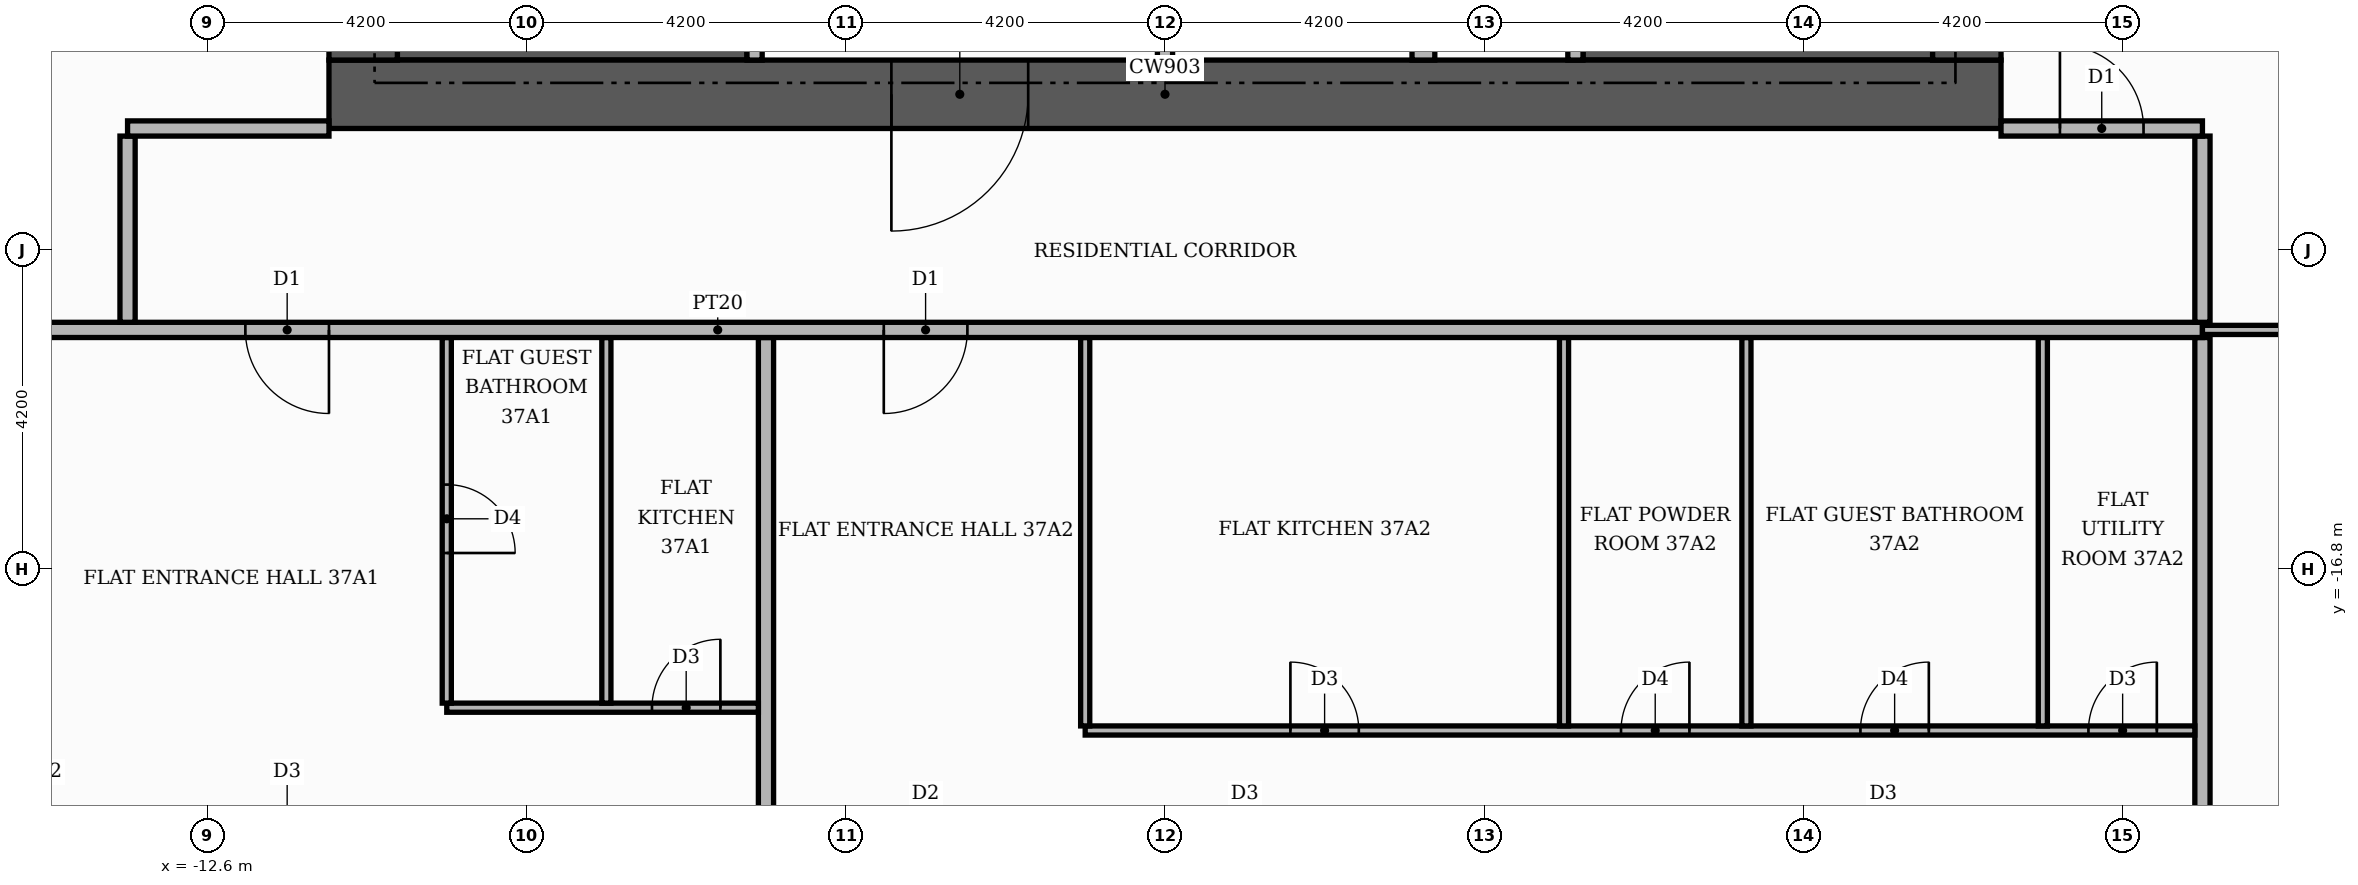
"""IFC4 building model, lengths in metres.
Left out: names, types, materials, properties, quantities, classifications, styles, units other than length and angle.
Written with IfcOpenShell. Run it as: python <this file> out.ifc"""

import sys

from ifc_helpers import new_model, si_unit, direction, frame, frame_2d, origin, place, context, subcontext, project, spatial, rectangle, extrude, element, fill, save


model = new_model("IFC4")
c1 = context("Model", 3, precision=1e-05, world=origin(), true_north=direction((0.0, 1.0)))
c2 = subcontext(c1, "Body", "Model", "MODEL_VIEW")
j1 = project(units=[si_unit("LENGTHUNIT", "METRE"), si_unit("PLANEANGLEUNIT", "RADIAN")], contexts=[c1])
p1 = place(None, origin())
s1 = spatial("IfcSite", under=j1, at=p1, CompositionType="ELEMENT")
p2 = place(p1, origin())
s2 = spatial("IfcBuilding", under=s1, at=p2, CompositionType="ELEMENT")
p3 = place(p2, frame((0.0, 0.0, 157.2)))
s3 = spatial("IfcBuildingStorey", under=s2, at=p3, CompositionType="ELEMENT", Elevation=157.2)
for number, where, z_axis, x_axis in (
    (1, (-10.1, -9.15, 0.0), (0.0, 0.0, 1.0), (1.0, 0.0, 0.0)),
    (2, (5.5, -9.15, 0.0), (0.0, 0.0, 1.0), (1.0, 0.0, 0.0)),
):
    element("IfcWall", number, at=place(p3, frame(where, z_axis=z_axis, x_axis=x_axis)), inside=s3, PredefinedType="SHEAR", context=c2, shape_type="SweptSolid", body=[
        extrude(rectangle(XDim=4.6, YDim=1.9, at=frame_2d((2.3, 0.0))), origin(), (0.0, 0.0, 1.0), 3.48),
    ])
p4 = place(p3, frame((-11.0, -10.55, 0.0), z_axis=(0.0, 0.0, 1.0), x_axis=(1.0, 0.0, 0.0)))
e3 = element("IfcWall", 3, at=p4, inside=s3, PredefinedType="SHEAR", context=c2, shape_type="SweptSolid", body=[
    extrude(rectangle(XDim=22.0, YDim=0.9, at=frame_2d((11.0, 0.0))), origin(), (0.0, 0.0, 1.0), 3.48),
])
p5 = place(p4, frame((7.4, 0.0, 0.0)))
e4 = element("IfcOpeningElement", 4, at=p5, cuts=e3, PredefinedType="OPENING", context=c2, shape_type="SweptSolid", body=[
    extrude(rectangle(XDim=1.8, YDim=2.2, at=frame_2d((0.9, 1.1))), frame((0.0, 0.46, 0.0), z_axis=(0.0, -1.0, 0.0), x_axis=(1.0, 0.0, 0.0)), (0.0, 0.0, 1.0), 0.92),
])
for number, where, z_axis, x_axis in (
    (5, (-10.55, -10.1, 0.0), (0.0, 0.0, 1.0), (0.0, 1.0, 0.0)),
    (6, (10.55, -10.1, 0.0), (0.0, 0.0, 1.0), (0.0, 1.0, 0.0)),
):
    element("IfcWall", number, at=place(p3, frame(where, z_axis=z_axis, x_axis=x_axis)), inside=s3, PredefinedType="SHEAR", context=c2, shape_type="SweptSolid", body=[
        extrude(rectangle(XDim=20.2, YDim=0.9, at=frame_2d((10.1, 0.0))), origin(), (0.0, 0.0, 1.0), 3.48),
    ])
p6 = place(p3, frame((-5.4, -10.1, 0.0), z_axis=(0.0, 0.0, 1.0), x_axis=(0.0, 1.0, 0.0)))
e7 = element("IfcWall", 7, at=p6, inside=s3, PredefinedType="PARTITIONING", context=c2, shape_type="SweptSolid", body=[
    extrude(rectangle(XDim=4.6, YDim=0.2, at=frame_2d((2.3, 0.0))), origin(), (0.0, 0.0, 1.0), 3.48),
])
p7 = place(p6, frame((2.9, 0.0, 0.0)))
e8 = element("IfcOpeningElement", 8, at=p7, cuts=e7, PredefinedType="OPENING", context=c2, shape_type="SweptSolid", body=[
    extrude(rectangle(XDim=1.0, YDim=2.1, at=frame_2d((0.5, 1.05))), frame((0.0, 0.11, 0.0), z_axis=(0.0, -1.0, 0.0), x_axis=(1.0, 0.0, 0.0)), (0.0, 0.0, 1.0), 0.22),
])
p8 = place(p3, frame((0.0, -10.1, 0.0), z_axis=(0.0, 0.0, 1.0), x_axis=(0.0, 1.0, 0.0)))
e9 = element("IfcWall", 9, at=p8, inside=s3, PredefinedType="PARTITIONING", context=c2, shape_type="SweptSolid", body=[
    extrude(rectangle(XDim=2.2, YDim=0.2, at=frame_2d((1.1, 0.0))), origin(), (0.0, 0.0, 1.0), 3.48),
])
p9 = place(p3, frame((3.4, -10.1, 0.0), z_axis=(0.0, 0.0, 1.0), x_axis=(0.0, 1.0, 0.0)))
e10 = element("IfcWall", 10, at=p9, inside=s3, PredefinedType="PARTITIONING", context=c2, shape_type="SweptSolid", body=[
    extrude(rectangle(XDim=2.2, YDim=0.3, at=frame_2d((1.1, 0.0))), origin(), (0.0, 0.0, 1.0), 3.48),
])
p10 = place(p3, frame((5.4, -10.1, 0.0), z_axis=(0.0, 0.0, 1.0), x_axis=(0.0, 1.0, 0.0)))
e11 = element("IfcWall", 11, at=p10, inside=s3, PredefinedType="PARTITIONING", context=c2, shape_type="SweptSolid", body=[
    extrude(rectangle(XDim=4.6, YDim=0.2, at=frame_2d((2.3, 0.0))), origin(), (0.0, 0.0, 1.0), 3.48),
])
p11 = place(p10, frame((2.9, 0.0, 0.0)))
e12 = element("IfcOpeningElement", 12, at=p11, cuts=e11, PredefinedType="OPENING", context=c2, shape_type="SweptSolid", body=[
    extrude(rectangle(XDim=1.0, YDim=2.1, at=frame_2d((0.5, 1.05))), frame((0.0, 0.11, 0.0), z_axis=(0.0, -1.0, 0.0), x_axis=(1.0, 0.0, 0.0)), (0.0, 0.0, 1.0), 0.22),
])
for number, where, z_axis, x_axis in (
    (13, (-5.25, -25.42, 0.0), (0.0, 0.0, 1.0), (0.0, 1.0, 0.0)),
    (14, (13.65, -25.42, 0.0), (0.0, 0.0, 1.0), (0.0, 1.0, 0.0)),
):
    element("IfcWall", number, at=place(p3, frame(where, z_axis=z_axis, x_axis=x_axis)), inside=s3, PredefinedType="PARTITIONING", context=c2, shape_type="SweptSolid", body=[
        extrude(rectangle(XDim=11.67, YDim=0.2, at=frame_2d((5.835, 0.0))), origin(), (0.0, 0.0, 1.0), 3.48),
    ])
p12 = place(p3, frame((-1.05, -18.92, 0.0), z_axis=(0.0, 0.0, 1.0), x_axis=(1.0, 0.0, 0.0)))
e15 = element("IfcWall", 15, at=p12, inside=s3, PredefinedType="PARTITIONING", context=c2, shape_type="SweptSolid", body=[
    extrude(rectangle(XDim=14.6, YDim=0.12, at=frame_2d((7.3, 0.0))), origin(), (0.0, 0.0, 1.0), 3.48),
])
p13 = place(p12, frame((2.7, 0.0, 0.0)))
e16 = element("IfcOpeningElement", 16, at=p13, cuts=e15, PredefinedType="OPENING", context=c2, shape_type="SweptSolid", body=[
    extrude(rectangle(XDim=0.9, YDim=2.1, at=frame_2d((0.45, 1.05))), frame((0.0, 0.07, 0.0), z_axis=(0.0, -1.0, 0.0), x_axis=(1.0, 0.0, 0.0)), (0.0, 0.0, 1.0), 0.14),
])
p14 = place(p12, frame((7.05, 0.0, 0.0)))
e17 = element("IfcOpeningElement", 17, at=p14, cuts=e15, PredefinedType="OPENING", context=c2, shape_type="SweptSolid", body=[
    extrude(rectangle(XDim=0.9, YDim=2.1, at=frame_2d((0.45, 1.05))), frame((0.0, 0.07, 0.0), z_axis=(0.0, -1.0, 0.0), x_axis=(1.0, 0.0, 0.0)), (0.0, 0.0, 1.0), 0.14),
])
p15 = place(p12, frame((10.2, 0.0, 0.0)))
e18 = element("IfcOpeningElement", 18, at=p15, cuts=e15, PredefinedType="OPENING", context=c2, shape_type="SweptSolid", body=[
    extrude(rectangle(XDim=0.9, YDim=2.1, at=frame_2d((0.45, 1.05))), frame((0.0, 0.07, 0.0), z_axis=(0.0, -1.0, 0.0), x_axis=(1.0, 0.0, 0.0)), (0.0, 0.0, 1.0), 0.14),
])
p16 = place(p12, frame((13.2, 0.0, 0.0)))
e19 = element("IfcOpeningElement", 19, at=p16, cuts=e15, PredefinedType="OPENING", context=c2, shape_type="SweptSolid", body=[
    extrude(rectangle(XDim=0.9, YDim=2.1, at=frame_2d((0.45, 1.05))), frame((0.0, 0.07, 0.0), z_axis=(0.0, -1.0, 0.0), x_axis=(1.0, 0.0, 0.0)), (0.0, 0.0, 1.0), 0.14),
])
for number, where, z_axis, x_axis in (
    (20, (-1.05, -18.86, 0.0), (0.0, 0.0, 1.0), (0.0, 1.0, 0.0)),
    (21, (5.25, -18.86, 0.0), (0.0, 0.0, 1.0), (0.0, 1.0, 0.0)),
    (22, (7.65, -18.86, 0.0), (0.0, 0.0, 1.0), (0.0, 1.0, 0.0)),
    (23, (11.55, -18.86, 0.0), (0.0, 0.0, 1.0), (0.0, 1.0, 0.0)),
):
    element("IfcWall", number, at=place(p3, frame(where, z_axis=z_axis, x_axis=x_axis)), inside=s3, PredefinedType="PARTITIONING", context=c2, shape_type="SweptSolid", body=[
        extrude(rectangle(XDim=5.11, YDim=0.12, at=frame_2d((2.555, 0.0))), origin(), (0.0, 0.0, 1.0), 3.48),
    ])
p17 = place(p3, frame((-9.45, -18.62, 0.0), z_axis=(0.0, 0.0, 1.0), x_axis=(1.0, 0.0, 0.0)))
e24 = element("IfcWall", 24, at=p17, inside=s3, PredefinedType="PARTITIONING", context=c2, shape_type="SweptSolid", body=[
    extrude(rectangle(XDim=4.1, YDim=0.12, at=frame_2d((2.05, 0.0))), origin(), (0.0, 0.0, 1.0), 3.48),
])
p18 = place(p17, frame((2.7, 0.0, 0.0)))
e25 = element("IfcOpeningElement", 25, at=p18, cuts=e24, PredefinedType="OPENING", context=c2, shape_type="SweptSolid", body=[
    extrude(rectangle(XDim=0.9, YDim=2.1, at=frame_2d((0.45, 1.05))), frame((0.0, 0.07, 0.0), z_axis=(0.0, -1.0, 0.0), x_axis=(1.0, 0.0, 0.0)), (0.0, 0.0, 1.0), 0.14),
])
p19 = place(p3, frame((-9.45, -18.56, 0.0), z_axis=(0.0, 0.0, 1.0), x_axis=(0.0, 1.0, 0.0)))
e26 = element("IfcWall", 26, at=p19, inside=s3, PredefinedType="PARTITIONING", context=c2, shape_type="SweptSolid", body=[
    extrude(rectangle(XDim=4.81, YDim=0.12, at=frame_2d((2.405, 0.0))), origin(), (0.0, 0.0, 1.0), 3.48),
])
p20 = place(p19, frame((1.975, 0.0, 0.0)))
e27 = element("IfcOpeningElement", 27, at=p20, cuts=e26, PredefinedType="OPENING", context=c2, shape_type="SweptSolid", body=[
    extrude(rectangle(XDim=0.9, YDim=2.1, at=frame_2d((0.45, 1.05))), frame((0.0, 0.07, 0.0), z_axis=(0.0, -1.0, 0.0), x_axis=(1.0, 0.0, 0.0)), (0.0, 0.0, 1.0), 0.14),
])
p21 = place(p3, frame((-7.35, -18.56, 0.0), z_axis=(0.0, 0.0, 1.0), x_axis=(0.0, 1.0, 0.0)))
e28 = element("IfcWall", 28, at=p21, inside=s3, PredefinedType="PARTITIONING", context=c2, shape_type="SweptSolid", body=[
    extrude(rectangle(XDim=4.81, YDim=0.12, at=frame_2d((2.405, 0.0))), origin(), (0.0, 0.0, 1.0), 3.48),
])
p22 = place(p3, frame((-25.42, -13.65, 0.0), z_axis=(0.0, 0.0, 1.0), x_axis=(1.0, 0.0, 0.0)))
e29 = element("IfcWall", 29, at=p22, inside=s3, PredefinedType="PARTITIONING", context=c2, shape_type="SweptSolid", body=[
    extrude(rectangle(XDim=39.07, YDim=0.2, at=frame_2d((19.535, 0.0))), origin(), (0.0, 0.0, 1.0), 3.48),
])
p23 = place(p22, frame((13.32, 0.0, 0.0)))
e30 = element("IfcOpeningElement", 30, at=p23, cuts=e29, PredefinedType="OPENING", context=c2, shape_type="SweptSolid", body=[
    extrude(rectangle(XDim=1.1, YDim=2.4, at=frame_2d((0.55, 1.2))), frame((0.0, 0.11, 0.0), z_axis=(0.0, -1.0, 0.0), x_axis=(1.0, 0.0, 0.0)), (0.0, 0.0, 1.0), 0.22),
])
p24 = place(p22, frame((21.72, 0.0, 0.0)))
e31 = element("IfcOpeningElement", 31, at=p24, cuts=e29, PredefinedType="OPENING", context=c2, shape_type="SweptSolid", body=[
    extrude(rectangle(XDim=1.1, YDim=2.4, at=frame_2d((0.55, 1.2))), frame((0.0, 0.11, 0.0), z_axis=(0.0, -1.0, 0.0), x_axis=(1.0, 0.0, 0.0)), (0.0, 0.0, 1.0), 0.22),
])
p25 = place(p3, frame((13.65, -13.65, 0.0), z_axis=(0.0, 0.0, 1.0), x_axis=(1.0, 0.0, 0.0)))
e32 = element("IfcWall", 32, at=p25, inside=s3, PredefinedType="PARTITIONING", context=c2, shape_type="SweptSolid", body=[
    extrude(rectangle(XDim=6.47, YDim=0.12, at=frame_2d((3.235, 0.0))), origin(), (0.0, 0.0, 1.0), 3.48),
])
p26 = place(p25, frame((2.785, 0.0, 0.0)))
e33 = element("IfcOpeningElement", 33, at=p26, cuts=e32, PredefinedType="OPENING", context=c2, shape_type="SweptSolid", body=[
    extrude(rectangle(XDim=0.9, YDim=2.1, at=frame_2d((0.45, 1.05))), frame((0.0, 0.07, 0.0), z_axis=(0.0, -1.0, 0.0), x_axis=(1.0, 0.0, 0.0)), (0.0, 0.0, 1.0), 0.14),
])
for number, where, z_axis, x_axis in (
    (34, (-13.65, -13.55, 0.0), (0.0, 0.0, 1.0), (0.0, 1.0, 0.0)),
    (35, (13.65, -13.55, 0.0), (0.0, 0.0, 1.0), (0.0, 1.0, 0.0)),
):
    element("IfcWall", number, at=place(p3, frame(where, z_axis=z_axis, x_axis=x_axis)), inside=s3, PredefinedType="PARTITIONING", context=c2, shape_type="SweptSolid", body=[
        extrude(rectangle(XDim=2.45, YDim=0.2, at=frame_2d((1.225, 0.0))), origin(), (0.0, 0.0, 1.0), 3.48),
    ])
p27 = place(p3, frame((-13.65, -11.0, 0.0), z_axis=(0.0, 0.0, 1.0), x_axis=(1.0, 0.0, 0.0)))
e36 = element("IfcWall", 36, at=p27, inside=s3, PredefinedType="PARTITIONING", context=c2, shape_type="SweptSolid", body=[
    extrude(rectangle(XDim=2.65, YDim=0.2, at=frame_2d((1.325, 0.0))), origin(), (0.0, 0.0, 1.0), 3.48),
])
p28 = place(p3, frame((11.0, -11.0, 0.0), z_axis=(0.0, 0.0, 1.0), x_axis=(1.0, 0.0, 0.0)))
e37 = element("IfcWall", 37, at=p28, inside=s3, PredefinedType="PARTITIONING", context=c2, shape_type="SweptSolid", body=[
    extrude(rectangle(XDim=2.65, YDim=0.2, at=frame_2d((1.325, 0.0))), origin(), (0.0, 0.0, 1.0), 3.48),
])
p29 = place(p28, frame((0.775, 0.0, 0.0)))
e38 = element("IfcOpeningElement", 38, at=p29, cuts=e37, PredefinedType="OPENING", context=c2, shape_type="SweptSolid", body=[
    extrude(rectangle(XDim=1.1, YDim=2.4, at=frame_2d((0.55, 1.2))), frame((0.0, 0.11, 0.0), z_axis=(0.0, -1.0, 0.0), x_axis=(1.0, 0.0, 0.0)), (0.0, 0.0, 1.0), 0.22),
])
p30 = place(p5, frame((1.8, 0.0, 0.0), z_axis=(0.0, 0.0, 1.0), x_axis=(-1.0, 0.0, 0.0)))
e39 = element("IfcDoor", 39, at=p30, inside=s3, OperationType="DOUBLE_DOOR_SINGLE_SWING", PredefinedType="DOOR", context=c2, shape_type="SweptSolid", body=[
    extrude(rectangle(XDim=1.8, YDim=2.2, at=frame_2d((0.9, 1.1))), frame((0.0, 0.025, 0.0), z_axis=(0.0, -1.0, 0.0), x_axis=(1.0, 0.0, 0.0)), (0.0, 0.0, 1.0), 0.05),
])
fill(e4, e39)
p31 = place(p23, frame((1.1, 0.0, 0.0), z_axis=(0.0, 0.0, 1.0), x_axis=(-1.0, 0.0, 0.0)))
e40 = element("IfcDoor", 40, at=p31, inside=s3, OperationType="SINGLE_SWING_RIGHT", PredefinedType="DOOR", context=c2, shape_type="SweptSolid", body=[
    extrude(rectangle(XDim=1.1, YDim=2.4, at=frame_2d((0.55, 1.2))), frame((0.0, 0.025, 0.0), z_axis=(0.0, -1.0, 0.0), x_axis=(1.0, 0.0, 0.0)), (0.0, 0.0, 1.0), 0.05),
])
fill(e30, e40)
p32 = place(p20, frame((0.9, 0.0, 0.0), z_axis=(0.0, 0.0, 1.0), x_axis=(-1.0, 0.0, 0.0)))
e41 = element("IfcDoor", 41, at=p32, inside=s3, OperationType="SINGLE_SWING_LEFT", PredefinedType="DOOR", context=c2, shape_type="SweptSolid", body=[
    extrude(rectangle(XDim=0.9, YDim=2.1, at=frame_2d((0.45, 1.05))), frame((0.0, 0.025, 0.0), z_axis=(0.0, -1.0, 0.0), x_axis=(1.0, 0.0, 0.0)), (0.0, 0.0, 1.0), 0.05),
])
fill(e27, e41)
p33 = place(p18, origin())
e42 = element("IfcDoor", 42, at=p33, inside=s3, OperationType="SINGLE_SWING_RIGHT", PredefinedType="DOOR", context=c2, shape_type="SweptSolid", body=[
    extrude(rectangle(XDim=0.9, YDim=2.1, at=frame_2d((0.45, 1.05))), frame((0.0, 0.025, 0.0), z_axis=(0.0, -1.0, 0.0), x_axis=(1.0, 0.0, 0.0)), (0.0, 0.0, 1.0), 0.05),
])
fill(e25, e42)
p34 = place(p24, frame((1.1, 0.0, 0.0), z_axis=(0.0, 0.0, 1.0), x_axis=(-1.0, 0.0, 0.0)))
e43 = element("IfcDoor", 43, at=p34, inside=s3, OperationType="SINGLE_SWING_LEFT", PredefinedType="DOOR", context=c2, shape_type="SweptSolid", body=[
    extrude(rectangle(XDim=1.1, YDim=2.4, at=frame_2d((0.55, 1.2))), frame((0.0, 0.025, 0.0), z_axis=(0.0, -1.0, 0.0), x_axis=(1.0, 0.0, 0.0)), (0.0, 0.0, 1.0), 0.05),
])
fill(e31, e43)
p35 = place(p13, origin())
e44 = element("IfcDoor", 44, at=p35, inside=s3, OperationType="SINGLE_SWING_LEFT", PredefinedType="DOOR", context=c2, shape_type="SweptSolid", body=[
    extrude(rectangle(XDim=0.9, YDim=2.1, at=frame_2d((0.45, 1.05))), frame((0.0, 0.025, 0.0), z_axis=(0.0, -1.0, 0.0), x_axis=(1.0, 0.0, 0.0)), (0.0, 0.0, 1.0), 0.05),
])
fill(e16, e44)
p36 = place(p14, origin())
e45 = element("IfcDoor", 45, at=p36, inside=s3, OperationType="SINGLE_SWING_RIGHT", PredefinedType="DOOR", context=c2, shape_type="SweptSolid", body=[
    extrude(rectangle(XDim=0.9, YDim=2.1, at=frame_2d((0.45, 1.05))), frame((0.0, 0.025, 0.0), z_axis=(0.0, -1.0, 0.0), x_axis=(1.0, 0.0, 0.0)), (0.0, 0.0, 1.0), 0.05),
])
fill(e17, e45)
p37 = place(p15, origin())
e46 = element("IfcDoor", 46, at=p37, inside=s3, OperationType="SINGLE_SWING_RIGHT", PredefinedType="DOOR", context=c2, shape_type="SweptSolid", body=[
    extrude(rectangle(XDim=0.9, YDim=2.1, at=frame_2d((0.45, 1.05))), frame((0.0, 0.025, 0.0), z_axis=(0.0, -1.0, 0.0), x_axis=(1.0, 0.0, 0.0)), (0.0, 0.0, 1.0), 0.05),
])
fill(e18, e46)
p38 = place(p16, origin())
e47 = element("IfcDoor", 47, at=p38, inside=s3, OperationType="SINGLE_SWING_RIGHT", PredefinedType="DOOR", context=c2, shape_type="SweptSolid", body=[
    extrude(rectangle(XDim=0.9, YDim=2.1, at=frame_2d((0.45, 1.05))), frame((0.0, 0.025, 0.0), z_axis=(0.0, -1.0, 0.0), x_axis=(1.0, 0.0, 0.0)), (0.0, 0.0, 1.0), 0.05),
])
fill(e19, e47)
p39 = place(p29, origin())
e48 = element("IfcDoor", 48, at=p39, inside=s3, OperationType="SINGLE_SWING_LEFT", PredefinedType="DOOR", context=c2, shape_type="SweptSolid", body=[
    extrude(rectangle(XDim=1.1, YDim=2.4, at=frame_2d((0.55, 1.2))), frame((0.0, 0.025, 0.0), z_axis=(0.0, -1.0, 0.0), x_axis=(1.0, 0.0, 0.0)), (0.0, 0.0, 1.0), 0.05),
])
fill(e38, e48)
save(model, sys.argv[1])
